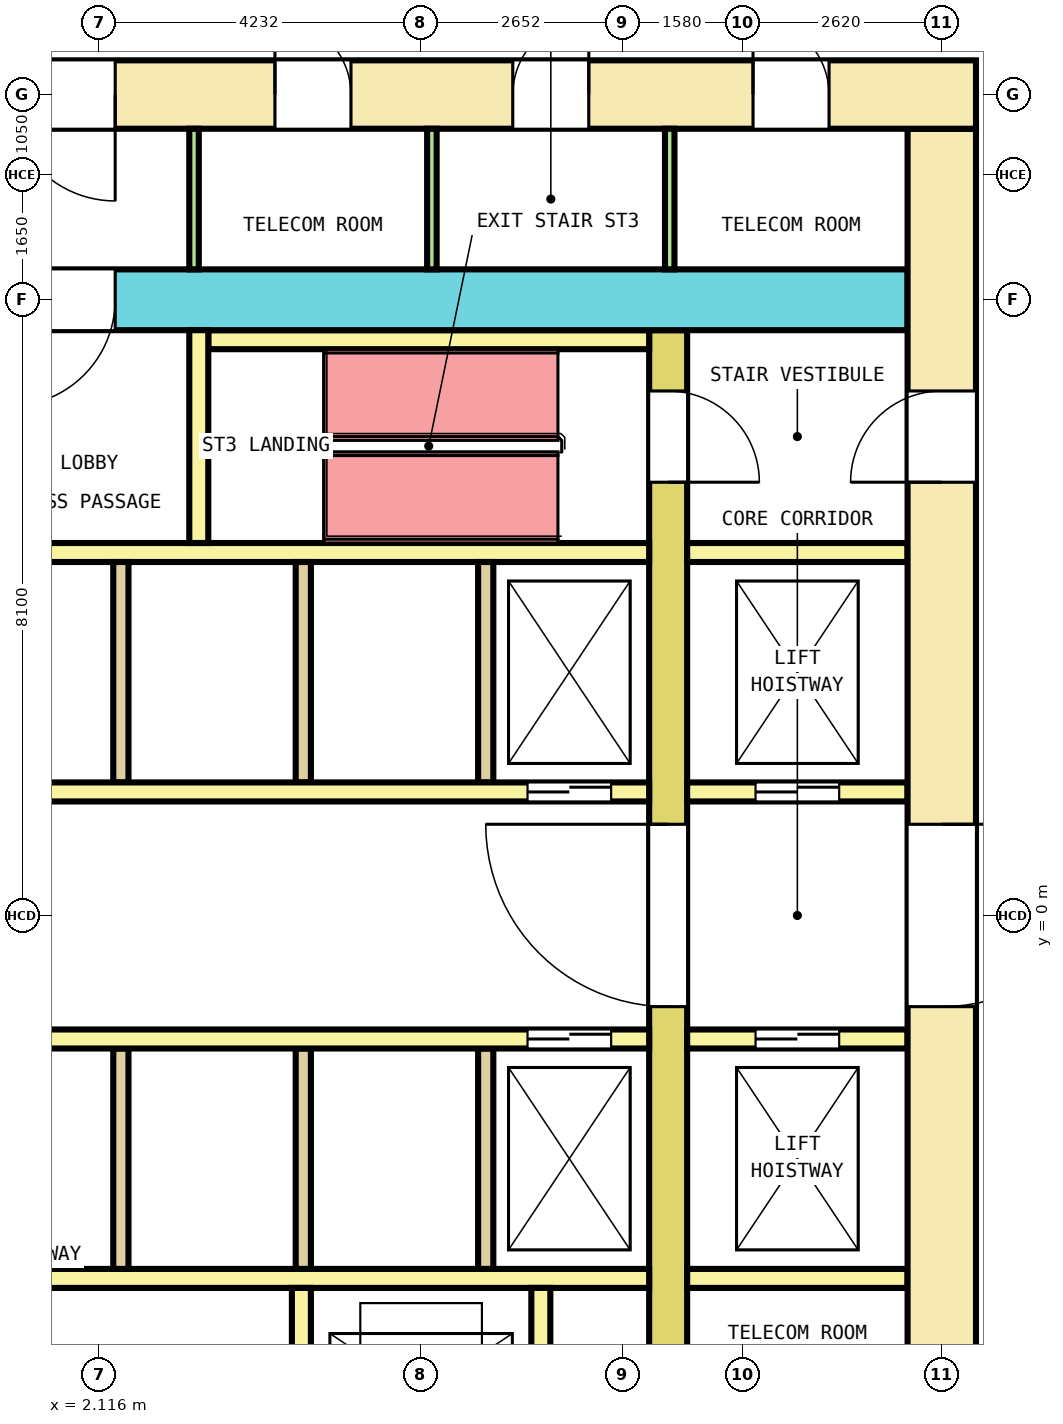
"""IFC4 building model, lengths in metres.
Left out: names, types, materials, properties, quantities, classifications, styles, units other than length and angle.
Written with IfcOpenShell. Run it as: python <this file> out.ifc"""

import sys

from ifc_helpers import new_model, si_unit, direction, frame, frame_2d, origin, place, context, subcontext, project, spatial, rectangle, extrude, element, fill, save


model = new_model("IFC4")
c1 = context("Model", 3, precision=1e-05, world=origin(), true_north=direction((0.0, 1.0)))
c2 = subcontext(c1, "Body", "Model", "MODEL_VIEW")
j1 = project(units=[si_unit("LENGTHUNIT", "METRE"), si_unit("PLANEANGLEUNIT", "RADIAN")], contexts=[c1])
p1 = place(None, origin())
s1 = spatial("IfcSite", under=j1, at=p1, CompositionType="ELEMENT")
p2 = place(p1, origin())
s2 = spatial("IfcBuilding", under=s1, at=p2, CompositionType="ELEMENT")
p3 = place(p2, frame((0.0, 0.0, 41.0)))
s3 = spatial("IfcBuildingStorey", under=s2, at=p3, CompositionType="ELEMENT", Elevation=41.0)
p4 = place(p3, frame((-13.65, 10.8, 0.0), z_axis=(0.0, 0.0, 1.0), x_axis=(1.0, 0.0, 0.0)))
e1 = element("IfcWall", 1, at=p4, inside=s3, PredefinedType="SHEAR", context=c2, shape_type="SweptSolid", body=[
    extrude(rectangle(XDim=27.3, YDim=0.9, at=frame_2d((13.65, 0.0))), origin(), (0.0, 0.0, 1.0), 4.1),
])
p5 = place(p4, frame((2.4, 0.0, 0.0)))
e2 = element("IfcOpeningElement", 2, at=p5, cuts=e1, PredefinedType="OPENING", context=c2, shape_type="SweptSolid", body=[
    extrude(rectangle(XDim=1.0, YDim=2.1, at=frame_2d((0.5, 1.05))), frame((0.0, 0.46, 0.0), z_axis=(0.0, -1.0, 0.0), x_axis=(1.0, 0.0, 0.0)), (0.0, 0.0, 1.0), 0.92),
])
p6 = place(p4, frame((6.494, 0.0, 0.0)))
e3 = element("IfcOpeningElement", 3, at=p6, cuts=e1, PredefinedType="OPENING", context=c2, shape_type="SweptSolid", body=[
    extrude(rectangle(XDim=1.0, YDim=2.1, at=frame_2d((0.5, 1.05))), frame((0.0, 0.46, 0.0), z_axis=(0.0, -1.0, 0.0), x_axis=(1.0, 0.0, 0.0)), (0.0, 0.0, 1.0), 0.92),
])
p7 = place(p4, frame((10.556, 0.0, 0.0)))
e4 = element("IfcOpeningElement", 4, at=p7, cuts=e1, PredefinedType="OPENING", context=c2, shape_type="SweptSolid", body=[
    extrude(rectangle(XDim=1.0, YDim=2.1, at=frame_2d((0.5, 1.05))), frame((0.0, 0.46, 0.0), z_axis=(0.0, -1.0, 0.0), x_axis=(1.0, 0.0, 0.0)), (0.0, 0.0, 1.0), 0.92),
])
p8 = place(p4, frame((18.077, 0.0, 0.0)))
e5 = element("IfcOpeningElement", 5, at=p8, cuts=e1, PredefinedType="OPENING", context=c2, shape_type="SweptSolid", body=[
    extrude(rectangle(XDim=1.0, YDim=2.1, at=frame_2d((0.5, 1.05))), frame((0.0, 0.46, 0.0), z_axis=(0.0, -1.0, 0.0), x_axis=(1.0, 0.0, 0.0)), (0.0, 0.0, 1.0), 0.92),
])
p9 = place(p4, frame((21.206, 0.0, 0.0)))
e6 = element("IfcOpeningElement", 6, at=p9, cuts=e1, PredefinedType="OPENING", context=c2, shape_type="SweptSolid", body=[
    extrude(rectangle(XDim=1.0, YDim=2.1, at=frame_2d((0.5, 1.05))), frame((0.0, 0.46, 0.0), z_axis=(0.0, -1.0, 0.0), x_axis=(1.0, 0.0, 0.0)), (0.0, 0.0, 1.0), 0.92),
])
p10 = place(p4, frame((24.367, 0.0, 0.0)))
e7 = element("IfcOpeningElement", 7, at=p10, cuts=e1, PredefinedType="OPENING", context=c2, shape_type="SweptSolid", body=[
    extrude(rectangle(XDim=1.0, YDim=2.1, at=frame_2d((0.5, 1.05))), frame((0.0, 0.46, 0.0), z_axis=(0.0, -1.0, 0.0), x_axis=(1.0, 0.0, 0.0)), (0.0, 0.0, 1.0), 0.92),
])
p11 = place(p4, frame((14.575, 0.0, 0.0)))
e8 = element("IfcOpeningElement", 8, at=p11, cuts=e1, PredefinedType="OPENING", context=c2, shape_type="SweptSolid", body=[
    extrude(rectangle(XDim=1.4, YDim=2.1, at=frame_2d((0.7, 1.05))), frame((0.0, 0.46, 0.0), z_axis=(0.0, -1.0, 0.0), x_axis=(1.0, 0.0, 0.0)), (0.0, 0.0, 1.0), 0.92),
])
p12 = place(p3, frame((13.2, -10.35, 0.0), z_axis=(0.0, 0.0, 1.0), x_axis=(0.0, 1.0, 0.0)))
e9 = element("IfcWall", 9, at=p12, inside=s3, PredefinedType="SHEAR", context=c2, shape_type="SweptSolid", body=[
    extrude(rectangle(XDim=20.7, YDim=0.9, at=frame_2d((10.35, 0.0))), origin(), (0.0, 0.0, 1.0), 4.1),
])
p13 = place(p12, frame((9.15, 0.0, 0.0)))
e10 = element("IfcOpeningElement", 10, at=p13, cuts=e9, PredefinedType="OPENING", context=c2, shape_type="SweptSolid", body=[
    extrude(rectangle(XDim=2.4, YDim=2.1, at=frame_2d((1.2, 1.05))), frame((0.0, 0.46, 0.0), z_axis=(0.0, -1.0, 0.0), x_axis=(1.0, 0.0, 0.0)), (0.0, 0.0, 1.0), 0.92),
])
p14 = place(p12, frame((16.05, 0.0, 0.0)))
e11 = element("IfcOpeningElement", 11, at=p14, cuts=e9, PredefinedType="OPENING", context=c2, shape_type="SweptSolid", body=[
    extrude(rectangle(XDim=1.2, YDim=2.1, at=frame_2d((0.6, 1.05))), frame((0.0, 0.46, 0.0), z_axis=(0.0, -1.0, 0.0), x_axis=(1.0, 0.0, 0.0)), (0.0, 0.0, 1.0), 0.92),
])
p15 = place(p12, frame((3.55, 0.0, 0.0)))
e12 = element("IfcOpeningElement", 12, at=p15, cuts=e9, PredefinedType="OPENING", context=c2, shape_type="SweptSolid", body=[
    extrude(rectangle(XDim=1.0, YDim=2.1, at=frame_2d((0.5, 1.05))), frame((0.0, 0.46, 0.0), z_axis=(0.0, -1.0, 0.0), x_axis=(1.0, 0.0, 0.0)), (0.0, 0.0, 1.0), 0.92),
])
p16 = place(p3, frame((-12.75, 8.1, 0.0), z_axis=(0.0, 0.0, 1.0), x_axis=(1.0, 0.0, 0.0)))
e13 = element("IfcWall", 13, at=p16, inside=s3, PredefinedType="SHEAR", context=c2, shape_type="SweptSolid", body=[
    extrude(rectangle(XDim=25.5, YDim=0.8, at=frame_2d((12.75, 0.0))), origin(), (0.0, 0.0, 1.0), 4.1),
])
p17 = place(p16, frame((13.675, 0.0, 0.0)))
e14 = element("IfcOpeningElement", 14, at=p17, cuts=e13, PredefinedType="OPENING", context=c2, shape_type="SweptSolid", body=[
    extrude(rectangle(XDim=1.4, YDim=2.1, at=frame_2d((0.7, 1.05))), frame((0.0, 0.41, 0.0), z_axis=(0.0, -1.0, 0.0), x_axis=(1.0, 0.0, 0.0)), (0.0, 0.0, 1.0), 0.82),
])
p18 = place(p3, frame((9.6, -7.7, 0.0), z_axis=(0.0, 0.0, 1.0), x_axis=(0.0, 1.0, 0.0)))
e15 = element("IfcWall", 15, at=p18, inside=s3, PredefinedType="SHEAR", context=c2, shape_type="SweptSolid", body=[
    extrude(rectangle(XDim=15.4, YDim=0.5, at=frame_2d((7.7, 0.0))), origin(), (0.0, 0.0, 1.0), 4.1),
])
p19 = place(p18, frame((6.5, 0.0, 0.0)))
e16 = element("IfcOpeningElement", 16, at=p19, cuts=e15, PredefinedType="OPENING", context=c2, shape_type="SweptSolid", body=[
    extrude(rectangle(XDim=2.4, YDim=2.1, at=frame_2d((1.2, 1.05))), frame((0.0, 0.26, 0.0), z_axis=(0.0, -1.0, 0.0), x_axis=(1.0, 0.0, 0.0)), (0.0, 0.0, 1.0), 0.52),
])
p20 = place(p18, frame((13.4, 0.0, 0.0)))
e17 = element("IfcOpeningElement", 17, at=p20, cuts=e15, PredefinedType="OPENING", context=c2, shape_type="SweptSolid", body=[
    extrude(rectangle(XDim=1.2, YDim=2.1, at=frame_2d((0.6, 1.05))), frame((0.0, 0.26, 0.0), z_axis=(0.0, -1.0, 0.0), x_axis=(1.0, 0.0, 0.0)), (0.0, 0.0, 1.0), 0.52),
])
p21 = place(p18, frame((0.9, 0.0, 0.0)))
e18 = element("IfcOpeningElement", 18, at=p21, cuts=e15, PredefinedType="OPENING", context=c2, shape_type="SweptSolid", body=[
    extrude(rectangle(XDim=1.0, YDim=2.1, at=frame_2d((0.5, 1.05))), frame((0.0, 0.26, 0.0), z_axis=(0.0, -1.0, 0.0), x_axis=(1.0, 0.0, 0.0)), (0.0, 0.0, 1.0), 0.52),
])
p22 = place(p3, frame((-9.35, 1.625, 0.0), z_axis=(0.0, 0.0, 1.0), x_axis=(1.0, 0.0, 0.0)))
e19 = element("IfcWall", 19, at=p22, inside=s3, PredefinedType="SOLIDWALL", context=c2, shape_type="SweptSolid", body=[
    extrude(rectangle(XDim=18.7, YDim=0.25, at=frame_2d((9.35, 0.0))), origin(), (0.0, 0.0, 1.0), 4.1),
])
p23 = place(p22, frame((0.5, 0.0, 0.0)))
e20 = element("IfcOpeningElement", 20, at=p23, cuts=e19, PredefinedType="OPENING", context=c2, shape_type="SweptSolid", body=[
    extrude(rectangle(XDim=1.1, YDim=2.1, at=frame_2d((0.55, 1.05))), frame((0.0, 0.135, 0.0), z_axis=(0.0, -1.0, 0.0), x_axis=(1.0, 0.0, 0.0)), (0.0, 0.0, 1.0), 0.27),
])
p24 = place(p22, frame((17.1, 0.0, 0.0)))
e21 = element("IfcOpeningElement", 21, at=p24, cuts=e19, PredefinedType="OPENING", context=c2, shape_type="SweptSolid", body=[
    extrude(rectangle(XDim=1.1, YDim=2.1, at=frame_2d((0.55, 1.05))), frame((0.0, 0.135, 0.0), z_axis=(0.0, -1.0, 0.0), x_axis=(1.0, 0.0, 0.0)), (0.0, 0.0, 1.0), 0.27),
])
p25 = place(p3, frame((9.85, 1.625, 0.0), z_axis=(0.0, 0.0, 1.0), x_axis=(1.0, 0.0, 0.0)))
e22 = element("IfcWall", 22, at=p25, inside=s3, PredefinedType="SOLIDWALL", context=c2, shape_type="SweptSolid", body=[
    extrude(rectangle(XDim=2.9, YDim=0.25, at=frame_2d((1.45, 0.0))), origin(), (0.0, 0.0, 1.0), 4.1),
])
p26 = place(p25, frame((0.9, 0.0, 0.0)))
e23 = element("IfcOpeningElement", 23, at=p26, cuts=e22, PredefinedType="OPENING", context=c2, shape_type="SweptSolid", body=[
    extrude(rectangle(XDim=1.1, YDim=2.1, at=frame_2d((0.55, 1.05))), frame((0.0, 0.135, 0.0), z_axis=(0.0, -1.0, 0.0), x_axis=(1.0, 0.0, 0.0)), (0.0, 0.0, 1.0), 0.27),
])
p27 = place(p3, frame((-9.35, 4.775, 0.0), z_axis=(0.0, 0.0, 1.0), x_axis=(1.0, 0.0, 0.0)))
e24 = element("IfcWall", 24, at=p27, inside=s3, PredefinedType="SOLIDWALL", context=c2, shape_type="SweptSolid", body=[
    extrude(rectangle(XDim=18.7, YDim=0.25, at=frame_2d((9.35, 0.0))), origin(), (0.0, 0.0, 1.0), 4.1),
])
p28 = place(p3, frame((9.85, 4.775, 0.0), z_axis=(0.0, 0.0, 1.0), x_axis=(1.0, 0.0, 0.0)))
e25 = element("IfcWall", 25, at=p28, inside=s3, PredefinedType="SOLIDWALL", context=c2, shape_type="SweptSolid", body=[
    extrude(rectangle(XDim=2.9, YDim=0.25, at=frame_2d((1.45, 0.0))), origin(), (0.0, 0.0, 1.0), 4.1),
])
for number, where, z_axis, x_axis in (
    (26, (2.4, 1.75, 0.0), (0.0, 0.0, 1.0), (0.0, 1.0, 0.0)),
    (27, (4.8, 1.75, 0.0), (0.0, 0.0, 1.0), (0.0, 1.0, 0.0)),
    (28, (7.2, 1.75, 0.0), (0.0, 0.0, 1.0), (0.0, 1.0, 0.0)),
):
    element("IfcWall", number, at=place(p3, frame(where, z_axis=z_axis, x_axis=x_axis)), inside=s3, PredefinedType="SOLIDWALL", context=c2, shape_type="SweptSolid", body=[
        extrude(rectangle(XDim=2.9, YDim=0.2, at=frame_2d((1.45, 0.0))), origin(), (0.0, 0.0, 1.0), 4.1),
    ])
p29 = place(p3, frame((-9.35, -1.625, 0.0), z_axis=(0.0, 0.0, 1.0), x_axis=(1.0, 0.0, 0.0)))
e29 = element("IfcWall", 29, at=p29, inside=s3, PredefinedType="SOLIDWALL", context=c2, shape_type="SweptSolid", body=[
    extrude(rectangle(XDim=18.7, YDim=0.25, at=frame_2d((9.35, 0.0))), origin(), (0.0, 0.0, 1.0), 4.1),
])
p30 = place(p29, frame((0.5, 0.0, 0.0)))
e30 = element("IfcOpeningElement", 30, at=p30, cuts=e29, PredefinedType="OPENING", context=c2, shape_type="SweptSolid", body=[
    extrude(rectangle(XDim=1.1, YDim=2.1, at=frame_2d((0.55, 1.05))), frame((0.0, 0.135, 0.0), z_axis=(0.0, -1.0, 0.0), x_axis=(1.0, 0.0, 0.0)), (0.0, 0.0, 1.0), 0.27),
])
p31 = place(p29, frame((17.1, 0.0, 0.0)))
e31 = element("IfcOpeningElement", 31, at=p31, cuts=e29, PredefinedType="OPENING", context=c2, shape_type="SweptSolid", body=[
    extrude(rectangle(XDim=1.1, YDim=2.1, at=frame_2d((0.55, 1.05))), frame((0.0, 0.135, 0.0), z_axis=(0.0, -1.0, 0.0), x_axis=(1.0, 0.0, 0.0)), (0.0, 0.0, 1.0), 0.27),
])
p32 = place(p3, frame((9.85, -1.625, 0.0), z_axis=(0.0, 0.0, 1.0), x_axis=(1.0, 0.0, 0.0)))
e32 = element("IfcWall", 32, at=p32, inside=s3, PredefinedType="SOLIDWALL", context=c2, shape_type="SweptSolid", body=[
    extrude(rectangle(XDim=2.9, YDim=0.25, at=frame_2d((1.45, 0.0))), origin(), (0.0, 0.0, 1.0), 4.1),
])
p33 = place(p32, frame((0.9, 0.0, 0.0)))
e33 = element("IfcOpeningElement", 33, at=p33, cuts=e32, PredefinedType="OPENING", context=c2, shape_type="SweptSolid", body=[
    extrude(rectangle(XDim=1.1, YDim=2.1, at=frame_2d((0.55, 1.05))), frame((0.0, 0.135, 0.0), z_axis=(0.0, -1.0, 0.0), x_axis=(1.0, 0.0, 0.0)), (0.0, 0.0, 1.0), 0.27),
])
p34 = place(p3, frame((-9.35, -4.775, 0.0), z_axis=(0.0, 0.0, 1.0), x_axis=(1.0, 0.0, 0.0)))
e34 = element("IfcWall", 34, at=p34, inside=s3, PredefinedType="SOLIDWALL", context=c2, shape_type="SweptSolid", body=[
    extrude(rectangle(XDim=18.7, YDim=0.25, at=frame_2d((9.35, 0.0))), origin(), (0.0, 0.0, 1.0), 4.1),
])
p35 = place(p3, frame((9.85, -4.775, 0.0), z_axis=(0.0, 0.0, 1.0), x_axis=(1.0, 0.0, 0.0)))
e35 = element("IfcWall", 35, at=p35, inside=s3, PredefinedType="SOLIDWALL", context=c2, shape_type="SweptSolid", body=[
    extrude(rectangle(XDim=2.9, YDim=0.25, at=frame_2d((1.45, 0.0))), origin(), (0.0, 0.0, 1.0), 4.1),
])
for number, where, z_axis, x_axis in (
    (36, (2.4, -4.65, 0.0), (0.0, 0.0, 1.0), (0.0, 1.0, 0.0)),
    (37, (4.8, -4.65, 0.0), (0.0, 0.0, 1.0), (0.0, 1.0, 0.0)),
    (38, (7.2, -4.65, 0.0), (0.0, 0.0, 1.0), (0.0, 1.0, 0.0)),
):
    element("IfcWall", number, at=place(p3, frame(where, z_axis=z_axis, x_axis=x_axis)), inside=s3, PredefinedType="SOLIDWALL", context=c2, shape_type="SweptSolid", body=[
        extrude(rectangle(XDim=2.9, YDim=0.2, at=frame_2d((1.45, 0.0))), origin(), (0.0, 0.0, 1.0), 4.1),
    ])
p36 = place(p3, frame((3.55, 7.575, 0.0), z_axis=(0.0, 0.0, 1.0), x_axis=(1.0, 0.0, 0.0)))
e39 = element("IfcWall", 39, at=p36, inside=s3, PredefinedType="SOLIDWALL", context=c2, shape_type="SweptSolid", body=[
    extrude(rectangle(XDim=5.8, YDim=0.25, at=frame_2d((2.9, 0.0))), origin(), (0.0, 0.0, 1.0), 4.1),
])
p37 = place(p3, frame((3.425, 4.9, 0.0), z_axis=(0.0, 0.0, 1.0), x_axis=(0.0, 1.0, 0.0)))
e40 = element("IfcWall", 40, at=p37, inside=s3, PredefinedType="SOLIDWALL", context=c2, shape_type="SweptSolid", body=[
    extrude(rectangle(XDim=2.8, YDim=0.25, at=frame_2d((1.4, 0.0))), origin(), (0.0, 0.0, 1.0), 4.1),
])
p38 = place(p3, frame((4.775, -7.7, 0.0), z_axis=(0.0, 0.0, 1.0), x_axis=(0.0, 1.0, 0.0)))
e41 = element("IfcWall", 41, at=p38, inside=s3, PredefinedType="SOLIDWALL", context=c2, shape_type="SweptSolid", body=[
    extrude(rectangle(XDim=2.8, YDim=0.25, at=frame_2d((1.4, 0.0))), origin(), (0.0, 0.0, 1.0), 4.1),
])
p39 = place(p38, frame((0.85, 0.0, 0.0)))
e42 = element("IfcOpeningElement", 42, at=p39, cuts=e41, PredefinedType="OPENING", context=c2, shape_type="SweptSolid", body=[
    extrude(rectangle(XDim=1.1, YDim=2.1, at=frame_2d((0.55, 1.05))), frame((0.0, 0.135, 0.0), z_axis=(0.0, -1.0, 0.0), x_axis=(1.0, 0.0, 0.0)), (0.0, 0.0, 1.0), 0.27),
])
p40 = place(p3, frame((7.925, -7.7, 0.0), z_axis=(0.0, 0.0, 1.0), x_axis=(0.0, 1.0, 0.0)))
e43 = element("IfcWall", 43, at=p40, inside=s3, PredefinedType="SOLIDWALL", context=c2, shape_type="SweptSolid", body=[
    extrude(rectangle(XDim=2.8, YDim=0.25, at=frame_2d((1.4, 0.0))), origin(), (0.0, 0.0, 1.0), 4.1),
])
for number, where, z_axis, x_axis in (
    (44, (3.363, 8.5, 0.0), (0.0, 0.0, 1.0), (0.0, 1.0, 0.0)),
    (45, (6.492, 8.5, 0.0), (0.0, 0.0, 1.0), (0.0, 1.0, 0.0)),
    (46, (9.621, 8.5, 0.0), (0.0, 0.0, 1.0), (0.0, 1.0, 0.0)),
):
    element("IfcWall", number, at=place(p3, frame(where, z_axis=z_axis, x_axis=x_axis)), inside=s3, PredefinedType="PARTITIONING", context=c2, shape_type="SweptSolid", body=[
        extrude(rectangle(XDim=1.85, YDim=0.125, at=frame_2d((0.925, 0.0))), origin(), (0.0, 0.0, 1.0), 4.1),
    ])
p41 = place(p24, origin())
e47 = element("IfcDoor", 47, at=p41, inside=s3, OperationType="DOUBLE_DOOR_SLIDING", PredefinedType="DOOR", context=c2, shape_type="SweptSolid", body=[
    extrude(rectangle(XDim=1.1, YDim=2.1, at=frame_2d((0.55, 1.05))), frame((0.0, 0.075, 0.0), z_axis=(0.0, -1.0, 0.0), x_axis=(1.0, 0.0, 0.0)), (0.0, 0.0, 1.0), 0.15),
])
fill(e21, e47)
p42 = place(p26, origin())
e48 = element("IfcDoor", 48, at=p42, inside=s3, OperationType="DOUBLE_DOOR_SLIDING", PredefinedType="DOOR", context=c2, shape_type="SweptSolid", body=[
    extrude(rectangle(XDim=1.1, YDim=2.1, at=frame_2d((0.55, 1.05))), frame((0.0, 0.075, 0.0), z_axis=(0.0, -1.0, 0.0), x_axis=(1.0, 0.0, 0.0)), (0.0, 0.0, 1.0), 0.15),
])
fill(e23, e48)
p43 = place(p31, origin())
e49 = element("IfcDoor", 49, at=p43, inside=s3, OperationType="DOUBLE_DOOR_SLIDING", PredefinedType="DOOR", context=c2, shape_type="SweptSolid", body=[
    extrude(rectangle(XDim=1.1, YDim=2.1, at=frame_2d((0.55, 1.05))), frame((0.0, 0.075, 0.0), z_axis=(0.0, -1.0, 0.0), x_axis=(1.0, 0.0, 0.0)), (0.0, 0.0, 1.0), 0.15),
])
fill(e31, e49)
p44 = place(p33, origin())
e50 = element("IfcDoor", 50, at=p44, inside=s3, OperationType="DOUBLE_DOOR_SLIDING", PredefinedType="DOOR", context=c2, shape_type="SweptSolid", body=[
    extrude(rectangle(XDim=1.1, YDim=2.1, at=frame_2d((0.55, 1.05))), frame((0.0, 0.075, 0.0), z_axis=(0.0, -1.0, 0.0), x_axis=(1.0, 0.0, 0.0)), (0.0, 0.0, 1.0), 0.15),
])
fill(e33, e50)
p45 = place(p19, origin())
e51 = element("IfcDoor", 51, at=p45, inside=s3, OperationType="DOUBLE_DOOR_SINGLE_SWING", PredefinedType="DOOR", context=c2, shape_type="SweptSolid", body=[
    extrude(rectangle(XDim=2.4, YDim=2.1, at=frame_2d((1.2, 1.05))), frame((0.0, 0.2, 0.0), z_axis=(0.0, -1.0, 0.0), x_axis=(1.0, 0.0, 0.0)), (0.0, 0.0, 1.0), 0.4),
])
fill(e16, e51)
p46 = place(p13, origin())
e52 = element("IfcDoor", 52, at=p46, inside=s3, OperationType="DOUBLE_DOOR_SINGLE_SWING", PredefinedType="DOOR", context=c2, shape_type="SweptSolid", body=[
    extrude(rectangle(XDim=2.4, YDim=2.1, at=frame_2d((1.2, 1.05))), frame((0.0, 0.3, 0.0), z_axis=(0.0, -1.0, 0.0), x_axis=(1.0, 0.0, 0.0)), (0.0, 0.0, 1.0), 0.6),
])
fill(e10, e52)
p47 = place(p20, origin())
e53 = element("IfcDoor", 53, at=p47, inside=s3, OperationType="SINGLE_SWING_RIGHT", PredefinedType="DOOR", context=c2, shape_type="SweptSolid", body=[
    extrude(rectangle(XDim=1.2, YDim=2.1, at=frame_2d((0.6, 1.05))), frame((0.0, 0.2, 0.0), z_axis=(0.0, -1.0, 0.0), x_axis=(1.0, 0.0, 0.0)), (0.0, 0.0, 1.0), 0.4),
])
fill(e17, e53)
p48 = place(p14, origin())
e54 = element("IfcDoor", 54, at=p48, inside=s3, OperationType="SINGLE_SWING_LEFT", PredefinedType="DOOR", context=c2, shape_type="SweptSolid", body=[
    extrude(rectangle(XDim=1.2, YDim=2.1, at=frame_2d((0.6, 1.05))), frame((0.0, 0.3, 0.0), z_axis=(0.0, -1.0, 0.0), x_axis=(1.0, 0.0, 0.0)), (0.0, 0.0, 1.0), 0.6),
])
fill(e11, e54)
p49 = place(p17, origin())
e55 = element("IfcDoor", 55, at=p49, inside=s3, OperationType="DOUBLE_DOOR_SINGLE_SWING", PredefinedType="DOOR", context=c2, shape_type="SweptSolid", body=[
    extrude(rectangle(XDim=1.4, YDim=2.1, at=frame_2d((0.7, 1.05))), frame((0.0, 0.3, 0.0), z_axis=(0.0, -1.0, 0.0), x_axis=(1.0, 0.0, 0.0)), (0.0, 0.0, 1.0), 0.6),
])
fill(e14, e55)
p50 = place(p8, origin())
e56 = element("IfcDoor", 56, at=p50, inside=s3, OperationType="SINGLE_SWING_LEFT", PredefinedType="DOOR", context=c2, shape_type="SweptSolid", body=[
    extrude(rectangle(XDim=1.0, YDim=2.1, at=frame_2d((0.5, 1.05))), frame((0.0, 0.3, 0.0), z_axis=(0.0, -1.0, 0.0), x_axis=(1.0, 0.0, 0.0)), (0.0, 0.0, 1.0), 0.6),
])
fill(e5, e56)
p51 = place(p9, origin())
e57 = element("IfcDoor", 57, at=p51, inside=s3, OperationType="SINGLE_SWING_RIGHT", PredefinedType="DOOR", context=c2, shape_type="SweptSolid", body=[
    extrude(rectangle(XDim=1.0, YDim=2.1, at=frame_2d((0.5, 1.05))), frame((0.0, 0.3, 0.0), z_axis=(0.0, -1.0, 0.0), x_axis=(1.0, 0.0, 0.0)), (0.0, 0.0, 1.0), 0.6),
])
fill(e6, e57)
p52 = place(p10, origin())
e58 = element("IfcDoor", 58, at=p52, inside=s3, OperationType="SINGLE_SWING_LEFT", PredefinedType="DOOR", context=c2, shape_type="SweptSolid", body=[
    extrude(rectangle(XDim=1.0, YDim=2.1, at=frame_2d((0.5, 1.05))), frame((0.0, 0.3, 0.0), z_axis=(0.0, -1.0, 0.0), x_axis=(1.0, 0.0, 0.0)), (0.0, 0.0, 1.0), 0.6),
])
fill(e7, e58)
p53 = place(p11, origin())
e59 = element("IfcDoor", 59, at=p53, inside=s3, OperationType="DOUBLE_DOOR_SINGLE_SWING", PredefinedType="DOOR", context=c2, shape_type="SweptSolid", body=[
    extrude(rectangle(XDim=1.4, YDim=2.1, at=frame_2d((0.7, 1.05))), frame((0.0, 0.3, 0.0), z_axis=(0.0, -1.0, 0.0), x_axis=(1.0, 0.0, 0.0)), (0.0, 0.0, 1.0), 0.6),
])
fill(e8, e59)
save(model, sys.argv[1])
